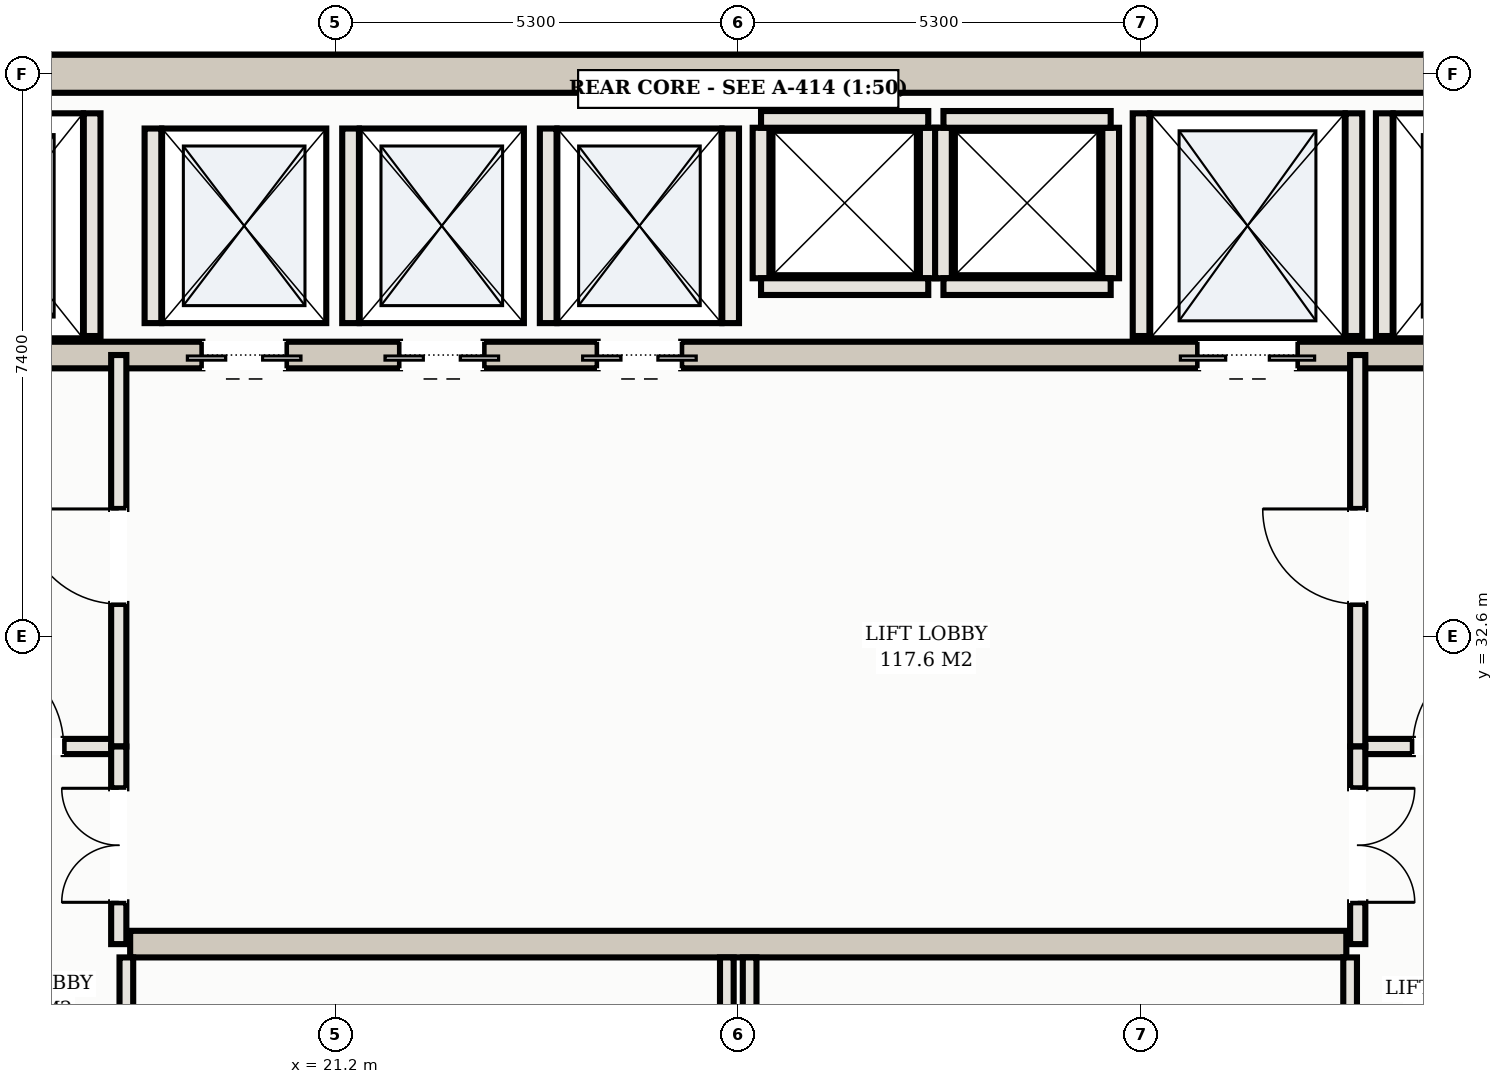
"""IFC4 building model, lengths in metres.
Left out: names, types, materials, properties, quantities, classifications, styles, units other than length and angle.
Written with IfcOpenShell. Run it as: python <this file> out.ifc"""

import sys

from ifc_helpers import new_model, si_unit, direction, frame, frame_2d, origin, place, context, subcontext, project, spatial, rectangle, extrude, element, fill, save


model = new_model("IFC4")
c1 = context("Model", 3, precision=1e-05, world=origin(), true_north=direction((0.0, 1.0)))
c2 = subcontext(c1, "Body", "Model", "MODEL_VIEW")
j1 = project(units=[si_unit("LENGTHUNIT", "METRE"), si_unit("PLANEANGLEUNIT", "RADIAN")], contexts=[c1])
p1 = place(None, origin())
s1 = spatial("IfcSite", under=j1, at=p1, CompositionType="ELEMENT")
p2 = place(p1, origin())
s2 = spatial("IfcBuilding", under=s1, at=p2, CompositionType="ELEMENT")
p3 = place(p2, frame((0.0, 0.0, 216.5)))
s3 = spatial("IfcBuildingStorey", under=s2, at=p3, CompositionType="ELEMENT", Elevation=216.5)
p4 = place(p3, frame((10.35, 40.0, 0.0), z_axis=(0.0, 0.0, 1.0), x_axis=(1.0, 0.0, 0.0)))
e1 = element("IfcWall", 1, at=p4, inside=s3, PredefinedType="SHEAR", context=c2, shape_type="SweptSolid", body=[
    extrude(rectangle(XDim=32.3, YDim=0.5, at=frame_2d((16.15, 0.0))), origin(), (0.0, 0.0, 1.0), 3.11),
])
p5 = place(p3, frame((15.5, 36.3, 0.0), z_axis=(0.0, 0.0, 1.0), x_axis=(1.0, 0.0, 0.0)))
e2 = element("IfcWall", 2, at=p5, inside=s3, PredefinedType="SHEAR", context=c2, shape_type="SweptSolid", body=[
    extrude(rectangle(XDim=22.0, YDim=0.35, at=frame_2d((11.0, 0.0))), origin(), (0.0, 0.0, 1.0), 3.11),
])
p6 = place(p5, frame((0.65, 0.0, 0.0)))
e3 = element("IfcOpeningElement", 3, at=p6, cuts=e2, PredefinedType="OPENING", context=c2, shape_type="SweptSolid", body=[
    extrude(rectangle(XDim=1.1, YDim=2.15, at=frame_2d((0.55, 1.075))), frame((0.0, 0.185, 0.0), z_axis=(0.0, -1.0, 0.0), x_axis=(1.0, 0.0, 0.0)), (0.0, 0.0, 1.0), 0.37),
])
p7 = place(p5, frame((20.25, 0.0, 0.0)))
e4 = element("IfcOpeningElement", 4, at=p7, cuts=e2, PredefinedType="OPENING", context=c2, shape_type="SweptSolid", body=[
    extrude(rectangle(XDim=1.1, YDim=2.15, at=frame_2d((0.55, 1.075))), frame((0.0, 0.185, 0.0), z_axis=(0.0, -1.0, 0.0), x_axis=(1.0, 0.0, 0.0)), (0.0, 0.0, 1.0), 0.37),
])
p8 = place(p5, frame((17.05, 0.0, 0.0)))
e5 = element("IfcOpeningElement", 5, at=p8, cuts=e2, PredefinedType="OPENING", context=c2, shape_type="SweptSolid", body=[
    extrude(rectangle(XDim=1.3, YDim=2.2, at=frame_2d((0.65, 1.1))), frame((0.0, 0.185, 0.0), z_axis=(0.0, -1.0, 0.0), x_axis=(1.0, 0.0, 0.0)), (0.0, 0.0, 1.0), 0.37),
])
p9 = place(p5, frame((3.95, 0.0, 0.0)))
e6 = element("IfcOpeningElement", 6, at=p9, cuts=e2, PredefinedType="OPENING", context=c2, shape_type="SweptSolid", body=[
    extrude(rectangle(XDim=1.1, YDim=2.15, at=frame_2d((0.55, 1.075))), frame((0.0, 0.185, 0.0), z_axis=(0.0, -1.0, 0.0), x_axis=(1.0, 0.0, 0.0)), (0.0, 0.0, 1.0), 0.37),
])
p10 = place(p5, frame((6.55, 0.0, 0.0)))
e7 = element("IfcOpeningElement", 7, at=p10, cuts=e2, PredefinedType="OPENING", context=c2, shape_type="SweptSolid", body=[
    extrude(rectangle(XDim=1.1, YDim=2.15, at=frame_2d((0.55, 1.075))), frame((0.0, 0.185, 0.0), z_axis=(0.0, -1.0, 0.0), x_axis=(1.0, 0.0, 0.0)), (0.0, 0.0, 1.0), 0.37),
])
p11 = place(p5, frame((9.15, 0.0, 0.0)))
e8 = element("IfcOpeningElement", 8, at=p11, cuts=e2, PredefinedType="OPENING", context=c2, shape_type="SweptSolid", body=[
    extrude(rectangle(XDim=1.1, YDim=2.15, at=frame_2d((0.55, 1.075))), frame((0.0, 0.185, 0.0), z_axis=(0.0, -1.0, 0.0), x_axis=(1.0, 0.0, 0.0)), (0.0, 0.0, 1.0), 0.37),
])
p12 = place(p3, frame((18.5, 28.55, 0.0), z_axis=(0.0, 0.0, 1.0), x_axis=(1.0, 0.0, 0.0)))
e9 = element("IfcWall", 9, at=p12, inside=s3, PredefinedType="SHEAR", context=c2, shape_type="SweptSolid", body=[
    extrude(rectangle(XDim=16.0, YDim=0.35, at=frame_2d((8.0, 0.0))), origin(), (0.0, 0.0, 1.0), 3.11),
])
for number, where, z_axis, x_axis in (
    (10, (18.0, 36.55, 0.0), (0.0, 0.0, 1.0), (0.0, 1.0, 0.0)),
    (11, (35.0, 36.55, 0.0), (0.0, 0.0, 1.0), (0.0, 1.0, 0.0)),
    (12, (31.8, 36.55, 0.0), (0.0, 0.0, 1.0), (0.0, 1.0, 0.0)),
    (13, (34.6, 36.55, 0.0), (0.0, 0.0, 1.0), (0.0, 1.0, 0.0)),
):
    element("IfcWall", number, at=place(p3, frame(where, z_axis=z_axis, x_axis=x_axis)), inside=s3, PredefinedType="SOLIDWALL", context=c2, shape_type="SweptSolid", body=[
        extrude(rectangle(XDim=2.93, YDim=0.22, at=frame_2d((1.465, 0.0))), origin(), (0.0, 0.0, 1.0), 3.11),
    ])
for number, where, z_axis, x_axis in (
    (14, (18.8, 36.72, 0.0), (0.0, 0.0, 1.0), (0.0, 1.0, 0.0)),
    (15, (21.4, 36.72, 0.0), (0.0, 0.0, 1.0), (0.0, 1.0, 0.0)),
    (16, (24.0, 36.72, 0.0), (0.0, 0.0, 1.0), (0.0, 1.0, 0.0)),
    (17, (26.4, 36.72, 0.0), (0.0, 0.0, 1.0), (0.0, 1.0, 0.0)),
):
    element("IfcWall", number, at=place(p3, frame(where, z_axis=z_axis, x_axis=x_axis)), inside=s3, PredefinedType="SOLIDWALL", context=c2, shape_type="SweptSolid", body=[
        extrude(rectangle(XDim=2.56, YDim=0.22, at=frame_2d((1.28, 0.0))), origin(), (0.0, 0.0, 1.0), 3.11),
    ])
for number, where, z_axis, x_axis in (
    (18, (26.8, 37.31, 0.0), (0.0, 0.0, 1.0), (0.0, 1.0, 0.0)),
    (19, (29.0, 37.31, 0.0), (0.0, 0.0, 1.0), (0.0, 1.0, 0.0)),
):
    element("IfcWall", number, at=place(p3, frame(where, z_axis=z_axis, x_axis=x_axis)), inside=s3, PredefinedType="SOLIDWALL", context=c2, shape_type="SweptSolid", body=[
        extrude(rectangle(XDim=1.98, YDim=0.22, at=frame_2d((0.99, 0.0))), origin(), (0.0, 0.0, 1.0), 3.11),
    ])
for number, where, z_axis, x_axis in (
    (20, (26.8, 39.4, 0.0), (0.0, 0.0, 1.0), (1.0, 0.0, 0.0)),
    (21, (26.8, 37.2, 0.0), (0.0, 0.0, 1.0), (1.0, 0.0, 0.0)),
):
    element("IfcWall", number, at=place(p3, frame(where, z_axis=z_axis, x_axis=x_axis)), inside=s3, PredefinedType="SOLIDWALL", context=c2, shape_type="SweptSolid", body=[
        extrude(rectangle(XDim=2.2, YDim=0.22, at=frame_2d((1.1, 0.0))), origin(), (0.0, 0.0, 1.0), 3.11),
    ])
for number, where, z_axis, x_axis in (
    (22, (29.2, 37.31, 0.0), (0.0, 0.0, 1.0), (0.0, 1.0, 0.0)),
    (23, (31.4, 37.31, 0.0), (0.0, 0.0, 1.0), (0.0, 1.0, 0.0)),
):
    element("IfcWall", number, at=place(p3, frame(where, z_axis=z_axis, x_axis=x_axis)), inside=s3, PredefinedType="SOLIDWALL", context=c2, shape_type="SweptSolid", body=[
        extrude(rectangle(XDim=1.98, YDim=0.22, at=frame_2d((0.99, 0.0))), origin(), (0.0, 0.0, 1.0), 3.11),
    ])
for number, where, z_axis, x_axis in (
    (24, (29.2, 39.4, 0.0), (0.0, 0.0, 1.0), (1.0, 0.0, 0.0)),
    (25, (29.2, 37.2, 0.0), (0.0, 0.0, 1.0), (1.0, 0.0, 0.0)),
):
    element("IfcWall", number, at=place(p3, frame(where, z_axis=z_axis, x_axis=x_axis)), inside=s3, PredefinedType="SOLIDWALL", context=c2, shape_type="SweptSolid", body=[
        extrude(rectangle(XDim=2.2, YDim=0.22, at=frame_2d((1.1, 0.0))), origin(), (0.0, 0.0, 1.0), 3.11),
    ])
p13 = place(p3, frame((15.1, 31.15, 0.0), z_axis=(0.0, 0.0, 1.0), x_axis=(1.0, 0.0, 0.0)))
e26 = element("IfcWall", 26, at=p13, inside=s3, PredefinedType="PARTITIONING", context=c2, shape_type="SweptSolid", body=[
    extrude(rectangle(XDim=3.25, YDim=0.2, at=frame_2d((1.625, 0.0))), origin(), (0.0, 0.0, 1.0), 2.43),
])
p14 = place(p13, frame((1.275, 0.0, 0.0)))
e27 = element("IfcOpeningElement", 27, at=p14, cuts=e26, PredefinedType="OPENING", context=c2, shape_type="SweptSolid", body=[
    extrude(rectangle(XDim=1.25, YDim=2.2, at=frame_2d((0.625, 1.1))), frame((0.0, 0.11, 0.0), z_axis=(0.0, -1.0, 0.0), x_axis=(1.0, 0.0, 0.0)), (0.0, 0.0, 1.0), 0.22),
])
p15 = place(p3, frame((18.35, 31.15, 0.0), z_axis=(0.0, 0.0, 1.0), x_axis=(0.0, 1.0, 0.0)))
e28 = element("IfcWall", 28, at=p15, inside=s3, PredefinedType="PARTITIONING", context=c2, shape_type="SweptSolid", body=[
    extrude(rectangle(XDim=5.15, YDim=0.2, at=frame_2d((2.575, 0.0))), origin(), (0.0, 0.0, 1.0), 2.43),
])
p16 = place(p15, frame((1.875, 0.0, 0.0)))
e29 = element("IfcOpeningElement", 29, at=p16, cuts=e28, PredefinedType="OPENING", context=c2, shape_type="SweptSolid", body=[
    extrude(rectangle(XDim=1.25, YDim=2.2, at=frame_2d((0.625, 1.1))), frame((0.0, 0.11, 0.0), z_axis=(0.0, -1.0, 0.0), x_axis=(1.0, 0.0, 0.0)), (0.0, 0.0, 1.0), 0.22),
])
p17 = place(p3, frame((34.65, 31.15, 0.0), z_axis=(0.0, 0.0, 1.0), x_axis=(1.0, 0.0, 0.0)))
e30 = element("IfcWall", 30, at=p17, inside=s3, PredefinedType="PARTITIONING", context=c2, shape_type="SweptSolid", body=[
    extrude(rectangle(XDim=3.25, YDim=0.2, at=frame_2d((1.625, 0.0))), origin(), (0.0, 0.0, 1.0), 2.43),
])
p18 = place(p17, frame((0.725, 0.0, 0.0)))
e31 = element("IfcOpeningElement", 31, at=p18, cuts=e30, PredefinedType="OPENING", context=c2, shape_type="SweptSolid", body=[
    extrude(rectangle(XDim=1.25, YDim=2.2, at=frame_2d((0.625, 1.1))), frame((0.0, 0.11, 0.0), z_axis=(0.0, -1.0, 0.0), x_axis=(1.0, 0.0, 0.0)), (0.0, 0.0, 1.0), 0.22),
])
p19 = place(p3, frame((34.65, 31.15, 0.0), z_axis=(0.0, 0.0, 1.0), x_axis=(0.0, 1.0, 0.0)))
e32 = element("IfcWall", 32, at=p19, inside=s3, PredefinedType="PARTITIONING", context=c2, shape_type="SweptSolid", body=[
    extrude(rectangle(XDim=5.15, YDim=0.2, at=frame_2d((2.575, 0.0))), origin(), (0.0, 0.0, 1.0), 2.43),
])
p20 = place(p19, frame((1.875, 0.0, 0.0)))
e33 = element("IfcOpeningElement", 33, at=p20, cuts=e32, PredefinedType="OPENING", context=c2, shape_type="SweptSolid", body=[
    extrude(rectangle(XDim=1.25, YDim=2.2, at=frame_2d((0.625, 1.1))), frame((0.0, 0.11, 0.0), z_axis=(0.0, -1.0, 0.0), x_axis=(1.0, 0.0, 0.0)), (0.0, 0.0, 1.0), 0.22),
])
p21 = place(p3, frame((18.35, 28.55, 0.0), z_axis=(0.0, 0.0, 1.0), x_axis=(0.0, 1.0, 0.0)))
e34 = element("IfcWall", 34, at=p21, inside=s3, PredefinedType="PARTITIONING", context=c2, shape_type="SweptSolid", body=[
    extrude(rectangle(XDim=2.6, YDim=0.2, at=frame_2d((1.3, 0.0))), origin(), (0.0, 0.0, 1.0), 2.43),
])
p22 = place(p21, frame((0.55, 0.0, 0.0)))
e35 = element("IfcOpeningElement", 35, at=p22, cuts=e34, PredefinedType="OPENING", context=c2, shape_type="SweptSolid", body=[
    extrude(rectangle(XDim=1.5, YDim=2.25, at=frame_2d((0.75, 1.125))), frame((0.0, 0.11, 0.0), z_axis=(0.0, -1.0, 0.0), x_axis=(1.0, 0.0, 0.0)), (0.0, 0.0, 1.0), 0.22),
])
p23 = place(p3, frame((34.65, 28.55, 0.0), z_axis=(0.0, 0.0, 1.0), x_axis=(0.0, 1.0, 0.0)))
e36 = element("IfcWall", 36, at=p23, inside=s3, PredefinedType="PARTITIONING", context=c2, shape_type="SweptSolid", body=[
    extrude(rectangle(XDim=2.6, YDim=0.2, at=frame_2d((1.3, 0.0))), origin(), (0.0, 0.0, 1.0), 2.43),
])
p24 = place(p23, frame((0.55, 0.0, 0.0)))
e37 = element("IfcOpeningElement", 37, at=p24, cuts=e36, PredefinedType="OPENING", context=c2, shape_type="SweptSolid", body=[
    extrude(rectangle(XDim=1.5, YDim=2.25, at=frame_2d((0.75, 1.125))), frame((0.0, 0.11, 0.0), z_axis=(0.0, -1.0, 0.0), x_axis=(1.0, 0.0, 0.0)), (0.0, 0.0, 1.0), 0.22),
])
for number, where, z_axis, x_axis in (
    (38, (18.45, 25.62, 0.0), (0.0, 0.0, 1.0), (0.0, 1.0, 0.0)),
    (39, (26.35, 25.62, 0.0), (0.0, 0.0, 1.0), (0.0, 1.0, 0.0)),
    (40, (26.65, 25.62, 0.0), (0.0, 0.0, 1.0), (0.0, 1.0, 0.0)),
    (41, (34.55, 25.62, 0.0), (0.0, 0.0, 1.0), (0.0, 1.0, 0.0)),
):
    element("IfcWall", number, at=place(p3, frame(where, z_axis=z_axis, x_axis=x_axis)), inside=s3, PredefinedType="PARTITIONING", context=c2, shape_type="SweptSolid", body=[
        extrude(rectangle(XDim=2.755, YDim=0.18, at=frame_2d((1.377, 0.0))), origin(), (0.0, 0.0, 1.0), 2.43),
    ])
p25 = place(p8, frame((1.3, 0.0, 0.0), z_axis=(0.0, 0.0, 1.0), x_axis=(-1.0, 0.0, 0.0)))
e42 = element("IfcDoor", 42, at=p25, inside=s3, OperationType="DOUBLE_DOOR_SLIDING", PredefinedType="DOOR", context=c2, shape_type="SweptSolid", body=[
    extrude(rectangle(XDim=1.3, YDim=2.2, at=frame_2d((0.65, 1.1))), frame((0.0, 0.025, 0.0), z_axis=(0.0, -1.0, 0.0), x_axis=(1.0, 0.0, 0.0)), (0.0, 0.0, 1.0), 0.05),
])
fill(e5, e42)
p26 = place(p9, frame((1.1, 0.0, 0.0), z_axis=(0.0, 0.0, 1.0), x_axis=(-1.0, 0.0, 0.0)))
e43 = element("IfcDoor", 43, at=p26, inside=s3, OperationType="DOUBLE_DOOR_SLIDING", PredefinedType="DOOR", context=c2, shape_type="SweptSolid", body=[
    extrude(rectangle(XDim=1.1, YDim=2.15, at=frame_2d((0.55, 1.075))), frame((0.0, 0.025, 0.0), z_axis=(0.0, -1.0, 0.0), x_axis=(1.0, 0.0, 0.0)), (0.0, 0.0, 1.0), 0.05),
])
fill(e6, e43)
p27 = place(p10, frame((1.1, 0.0, 0.0), z_axis=(0.0, 0.0, 1.0), x_axis=(-1.0, 0.0, 0.0)))
e44 = element("IfcDoor", 44, at=p27, inside=s3, OperationType="DOUBLE_DOOR_SLIDING", PredefinedType="DOOR", context=c2, shape_type="SweptSolid", body=[
    extrude(rectangle(XDim=1.1, YDim=2.15, at=frame_2d((0.55, 1.075))), frame((0.0, 0.025, 0.0), z_axis=(0.0, -1.0, 0.0), x_axis=(1.0, 0.0, 0.0)), (0.0, 0.0, 1.0), 0.05),
])
fill(e7, e44)
p28 = place(p11, frame((1.1, 0.0, 0.0), z_axis=(0.0, 0.0, 1.0), x_axis=(-1.0, 0.0, 0.0)))
e45 = element("IfcDoor", 45, at=p28, inside=s3, OperationType="DOUBLE_DOOR_SLIDING", PredefinedType="DOOR", context=c2, shape_type="SweptSolid", body=[
    extrude(rectangle(XDim=1.1, YDim=2.15, at=frame_2d((0.55, 1.075))), frame((0.0, 0.025, 0.0), z_axis=(0.0, -1.0, 0.0), x_axis=(1.0, 0.0, 0.0)), (0.0, 0.0, 1.0), 0.05),
])
fill(e8, e45)
p29 = place(p14, origin())
e46 = element("IfcDoor", 46, at=p29, inside=s3, OperationType="SINGLE_SWING_LEFT", PredefinedType="DOOR", context=c2, shape_type="SweptSolid", body=[
    extrude(rectangle(XDim=1.25, YDim=2.2, at=frame_2d((0.625, 1.1))), frame((0.0, 0.025, 0.0), z_axis=(0.0, -1.0, 0.0), x_axis=(1.0, 0.0, 0.0)), (0.0, 0.0, 1.0), 0.05),
])
fill(e27, e46)
p30 = place(p16, origin())
e47 = element("IfcDoor", 47, at=p30, inside=s3, OperationType="SINGLE_SWING_RIGHT", PredefinedType="DOOR", context=c2, shape_type="SweptSolid", body=[
    extrude(rectangle(XDim=1.25, YDim=2.2, at=frame_2d((0.625, 1.1))), frame((0.0, 0.025, 0.0), z_axis=(0.0, -1.0, 0.0), x_axis=(1.0, 0.0, 0.0)), (0.0, 0.0, 1.0), 0.05),
])
fill(e29, e47)
p31 = place(p18, origin())
e48 = element("IfcDoor", 48, at=p31, inside=s3, OperationType="SINGLE_SWING_RIGHT", PredefinedType="DOOR", context=c2, shape_type="SweptSolid", body=[
    extrude(rectangle(XDim=1.25, YDim=2.2, at=frame_2d((0.625, 1.1))), frame((0.0, 0.025, 0.0), z_axis=(0.0, -1.0, 0.0), x_axis=(1.0, 0.0, 0.0)), (0.0, 0.0, 1.0), 0.05),
])
fill(e31, e48)
p32 = place(p20, origin())
e49 = element("IfcDoor", 49, at=p32, inside=s3, OperationType="SINGLE_SWING_RIGHT", PredefinedType="DOOR", context=c2, shape_type="SweptSolid", body=[
    extrude(rectangle(XDim=1.25, YDim=2.2, at=frame_2d((0.625, 1.1))), frame((0.0, 0.025, 0.0), z_axis=(0.0, -1.0, 0.0), x_axis=(1.0, 0.0, 0.0)), (0.0, 0.0, 1.0), 0.05),
])
fill(e33, e49)
p33 = place(p22, origin())
e50 = element("IfcDoor", 50, at=p33, inside=s3, OperationType="DOUBLE_DOOR_SINGLE_SWING", PredefinedType="DOOR", context=c2, shape_type="SweptSolid", body=[
    extrude(rectangle(XDim=1.5, YDim=2.25, at=frame_2d((0.75, 1.125))), frame((0.0, 0.025, 0.0), z_axis=(0.0, -1.0, 0.0), x_axis=(1.0, 0.0, 0.0)), (0.0, 0.0, 1.0), 0.05),
])
fill(e35, e50)
p34 = place(p24, frame((1.5, 0.0, 0.0), z_axis=(0.0, 0.0, 1.0), x_axis=(-1.0, 0.0, 0.0)))
e51 = element("IfcDoor", 51, at=p34, inside=s3, OperationType="DOUBLE_DOOR_SINGLE_SWING", PredefinedType="DOOR", context=c2, shape_type="SweptSolid", body=[
    extrude(rectangle(XDim=1.5, YDim=2.25, at=frame_2d((0.75, 1.125))), frame((0.0, 0.025, 0.0), z_axis=(0.0, -1.0, 0.0), x_axis=(1.0, 0.0, 0.0)), (0.0, 0.0, 1.0), 0.05),
])
fill(e37, e51)
save(model, sys.argv[1])
